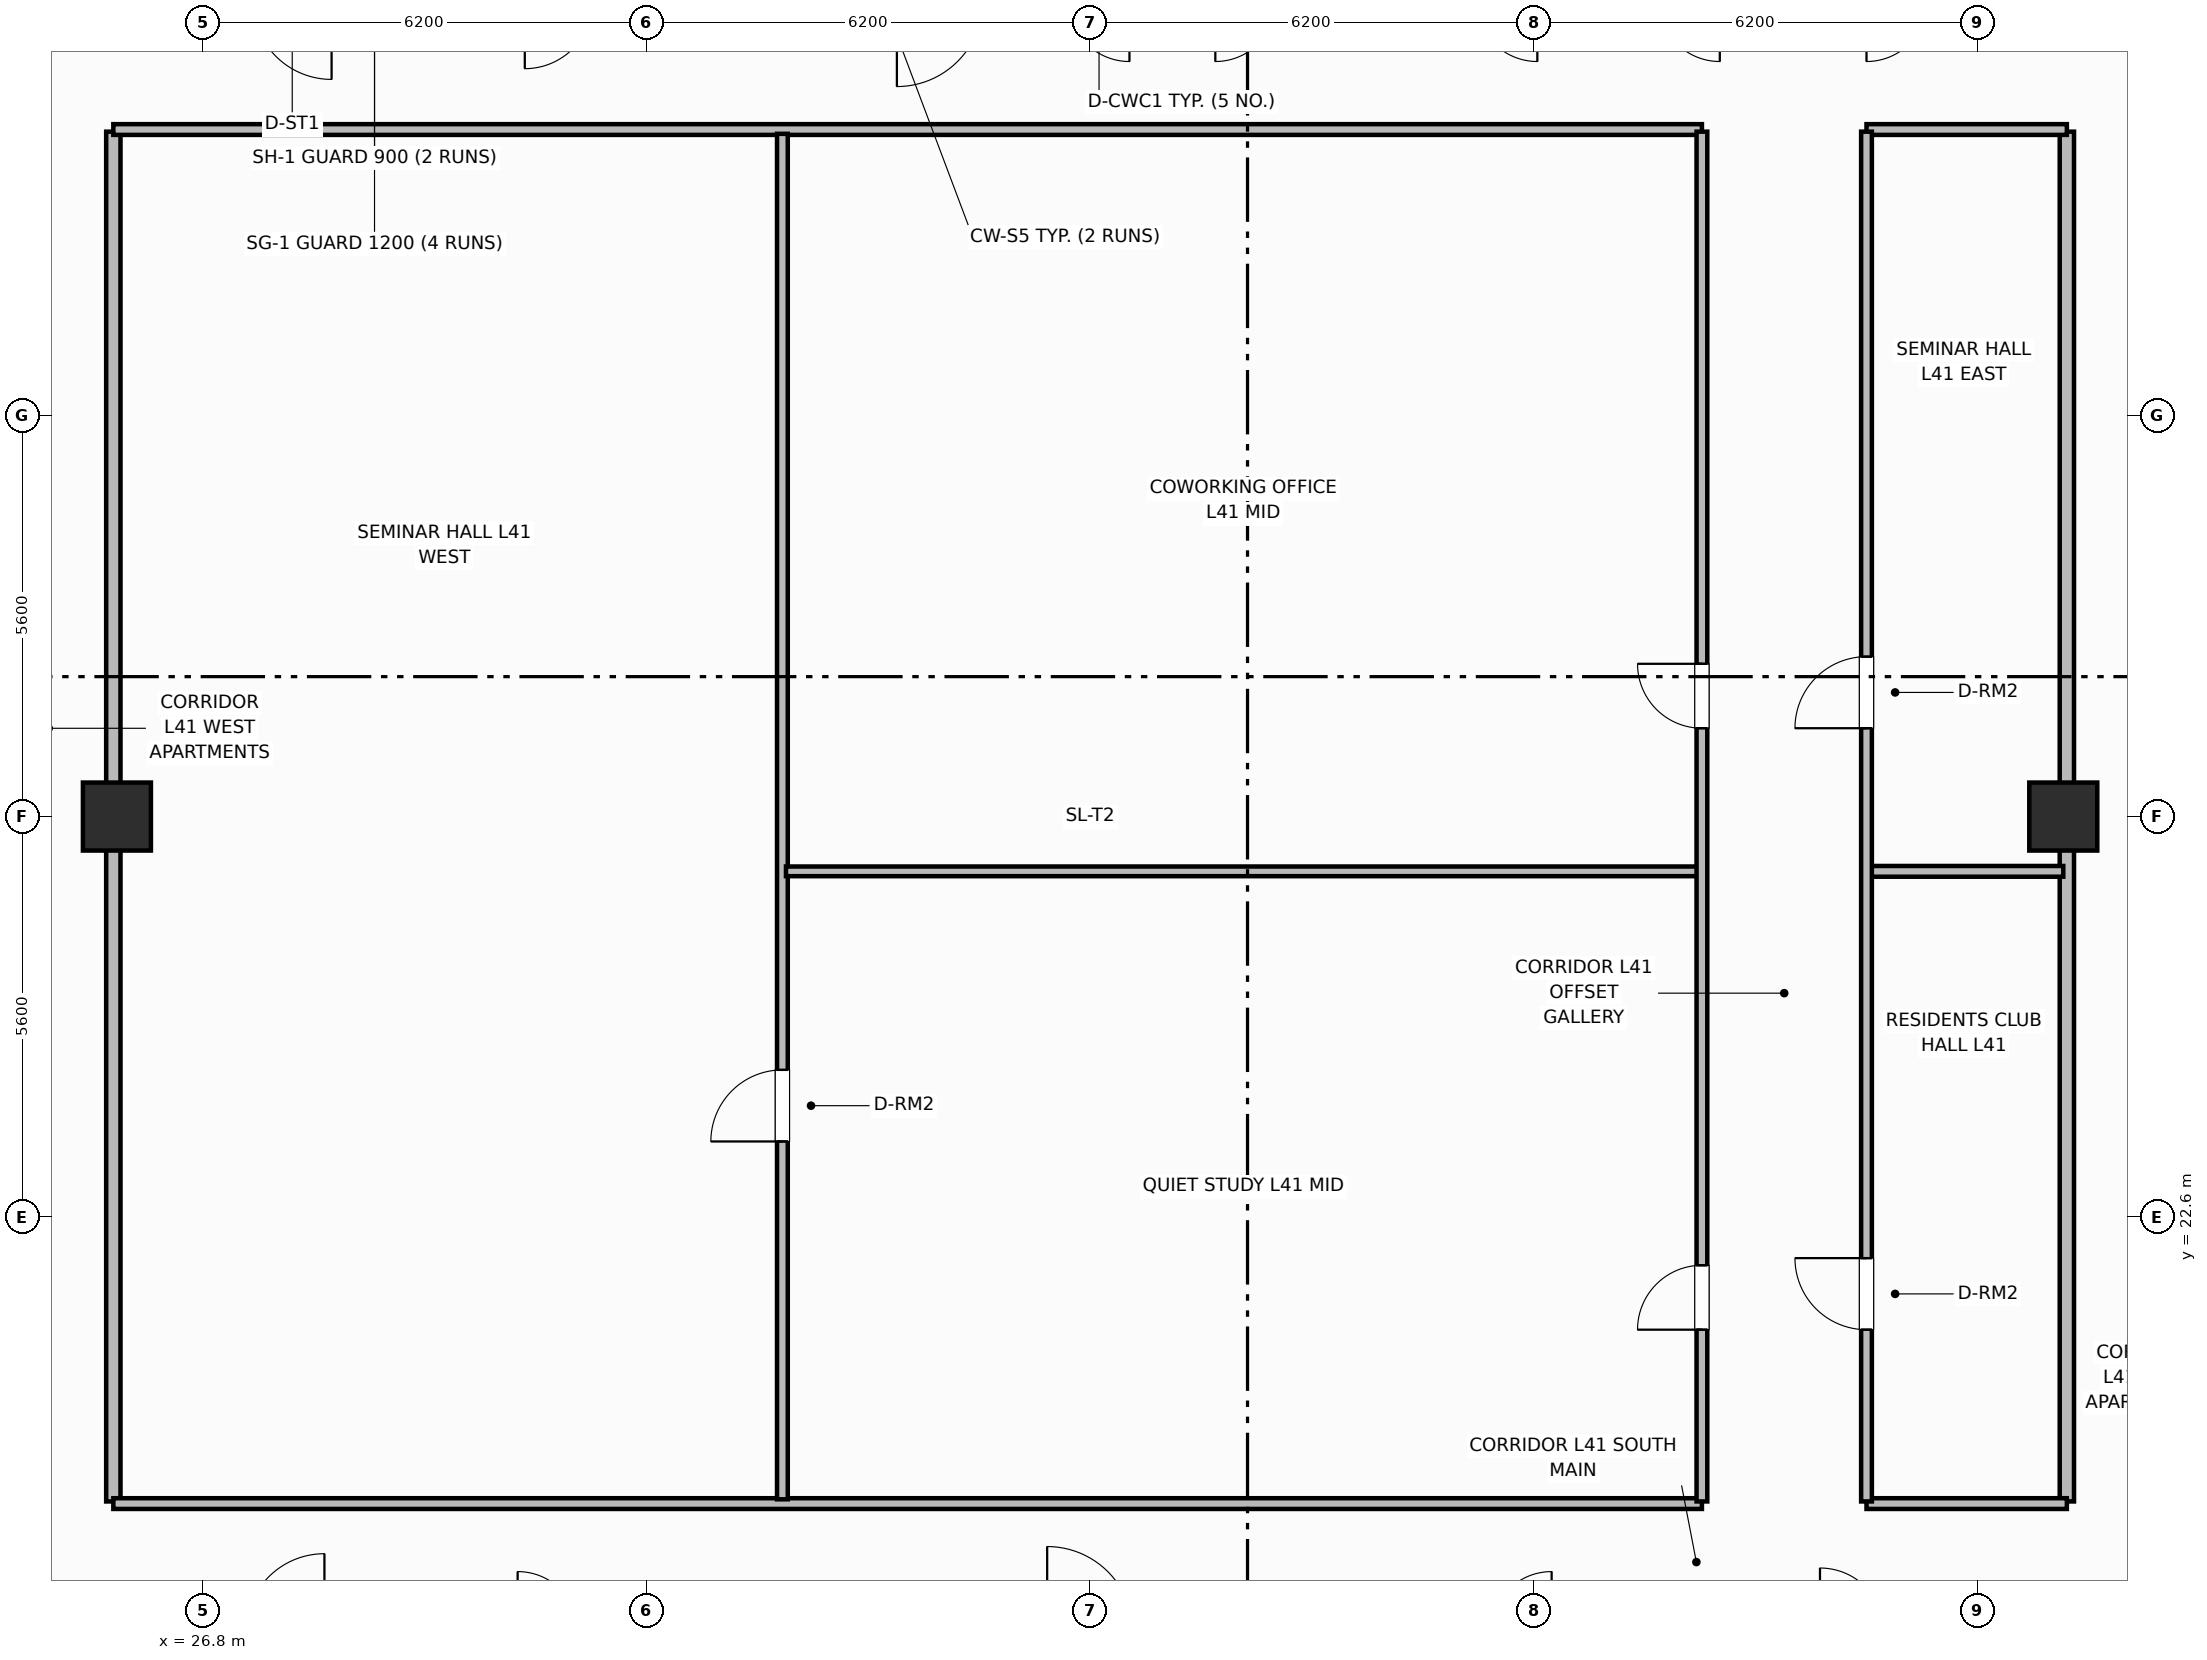
"""IFC4 building model, lengths in metres.
Left out: names, types, materials, properties, quantities, classifications, styles, units other than length and angle.
Written with IfcOpenShell. Run it as: python <this file> out.ifc"""

import sys

from ifc_helpers import new_model, si_unit, direction, frame, frame_2d, origin, origin_2d, place, context, subcontext, project, spatial, rectangle, extrude, element, fill, save


model = new_model("IFC4")
c1 = context("Model", 3, precision=1e-05, world=origin(), true_north=direction((0.0, 1.0)))
c2 = subcontext(c1, "Body", "Model", "MODEL_VIEW")
j1 = project(units=[si_unit("LENGTHUNIT", "METRE"), si_unit("PLANEANGLEUNIT", "RADIAN")], contexts=[c1])
p1 = place(None, origin())
s1 = spatial("IfcSite", under=j1, at=p1, CompositionType="ELEMENT")
p2 = place(p1, origin())
s2 = spatial("IfcBuilding", under=s1, at=p2, CompositionType="ELEMENT")
p3 = place(p2, frame((0.0, 0.0, 166.3)))
s3 = spatial("IfcBuildingStorey", under=s2, at=p3, CompositionType="ELEMENT", Elevation=166.3)
for number, where, z_axis, x_axis in (
    (1, (25.6, 28.2, 0.0), (0.0, 0.0, 1.0), (1.0, 0.0, 0.0)),
    (2, (52.8, 28.2, 0.0), (0.0, 0.0, 1.0), (1.0, 0.0, 0.0)),
):
    element("IfcColumn", number, at=place(p3, frame(where, z_axis=z_axis, x_axis=x_axis)), inside=s3, PredefinedType="COLUMN", context=c2, shape_type="SweptSolid", body=[
        extrude(rectangle(XDim=0.95, YDim=0.95, at=origin_2d()), origin(), (0.0, 0.0, 1.0), 3.7),
    ])
for number, where, z_axis, x_axis in (
    (3, (25.55, 18.63, 0.0), (0.0, 0.0, 1.0), (0.0, 1.0, 0.0)),
    (4, (52.85, 18.63, 0.0), (0.0, 0.0, 1.0), (0.0, 1.0, 0.0)),
):
    element("IfcWall", number, at=place(p3, frame(where, z_axis=z_axis, x_axis=x_axis)), inside=s3, PredefinedType="PARTITIONING", context=c2, shape_type="SweptSolid", body=[
        extrude(rectangle(XDim=19.14, YDim=0.2, at=frame_2d((9.57, 0.0))), origin(), (0.0, 0.0, 1.0), 2.55),
    ])
p4 = place(p3, frame((25.55, 18.6, 0.0), z_axis=(0.0, 0.0, 1.0), x_axis=(1.0, 0.0, 0.0)))
e5 = element("IfcWall", 5, at=p4, inside=s3, PredefinedType="PARTITIONING", context=c2, shape_type="SweptSolid", body=[
    extrude(rectangle(XDim=22.2, YDim=0.15, at=frame_2d((11.1, 0.0))), origin(), (0.0, 0.0, 1.0), 2.55),
])
p5 = place(p3, frame((50.05, 18.6, 0.0), z_axis=(0.0, 0.0, 1.0), x_axis=(1.0, 0.0, 0.0)))
e6 = element("IfcWall", 6, at=p5, inside=s3, PredefinedType="PARTITIONING", context=c2, shape_type="SweptSolid", body=[
    extrude(rectangle(XDim=2.8, YDim=0.15, at=frame_2d((1.4, 0.0))), origin(), (0.0, 0.0, 1.0), 2.55),
])
p6 = place(p3, frame((25.55, 37.8, 0.0), z_axis=(0.0, 0.0, 1.0), x_axis=(1.0, 0.0, 0.0)))
e7 = element("IfcWall", 7, at=p6, inside=s3, PredefinedType="PARTITIONING", context=c2, shape_type="SweptSolid", body=[
    extrude(rectangle(XDim=22.2, YDim=0.15, at=frame_2d((11.1, 0.0))), origin(), (0.0, 0.0, 1.0), 2.55),
])
p7 = place(p3, frame((50.05, 37.8, 0.0), z_axis=(0.0, 0.0, 1.0), x_axis=(1.0, 0.0, 0.0)))
e8 = element("IfcWall", 8, at=p7, inside=s3, PredefinedType="PARTITIONING", context=c2, shape_type="SweptSolid", body=[
    extrude(rectangle(XDim=2.8, YDim=0.15, at=frame_2d((1.4, 0.0))), origin(), (0.0, 0.0, 1.0), 2.55),
])
p8 = place(p3, frame((34.9, 18.66, 0.0), z_axis=(0.0, 0.0, 1.0), x_axis=(0.0, 1.0, 0.0)))
e9 = element("IfcWall", 9, at=p8, inside=s3, PredefinedType="PARTITIONING", context=c2, shape_type="SweptSolid", body=[
    extrude(rectangle(XDim=19.08, YDim=0.15, at=frame_2d((9.54, 0.0))), origin(), (0.0, 0.0, 1.0), 2.55),
])
p9 = place(p8, frame((5.0, 0.0, 0.0)))
e10 = element("IfcOpeningElement", 10, at=p9, cuts=e9, PredefinedType="OPENING", context=c2, shape_type="SweptSolid", body=[
    extrude(rectangle(XDim=1.0, YDim=2.15, at=frame_2d((0.5, 1.075))), frame((0.0, 0.085, 0.0), z_axis=(0.0, -1.0, 0.0), x_axis=(1.0, 0.0, 0.0)), (0.0, 0.0, 1.0), 0.17),
])
p10 = place(p3, frame((34.95, 27.434, 0.0), z_axis=(0.0, 0.0, 1.0), x_axis=(1.0, 0.0, 0.0)))
e11 = element("IfcWall", 11, at=p10, inside=s3, PredefinedType="PARTITIONING", context=c2, shape_type="SweptSolid", body=[
    extrude(rectangle(XDim=12.81, YDim=0.135, at=frame_2d((6.405, 0.0))), origin(), (0.0, 0.0, 1.0), 2.55),
])
p11 = place(p3, frame((50.08, 27.434, 0.0), z_axis=(0.0, 0.0, 1.0), x_axis=(1.0, 0.0, 0.0)))
e12 = element("IfcWall", 12, at=p11, inside=s3, PredefinedType="PARTITIONING", context=c2, shape_type="SweptSolid", body=[
    extrude(rectangle(XDim=2.72, YDim=0.15, at=frame_2d((1.36, 0.0))), origin(), (0.0, 0.0, 1.0), 2.55),
])
p12 = place(p3, frame((47.75, 18.63, 0.0), z_axis=(0.0, 0.0, 1.0), x_axis=(0.0, 1.0, 0.0)))
e13 = element("IfcWall", 13, at=p12, inside=s3, PredefinedType="PARTITIONING", context=c2, shape_type="SweptSolid", body=[
    extrude(rectangle(XDim=19.14, YDim=0.15, at=frame_2d((9.57, 0.0))), origin(), (0.0, 0.0, 1.0), 2.55),
])
p13 = place(p12, frame((2.4, 0.0, 0.0)))
e14 = element("IfcOpeningElement", 14, at=p13, cuts=e13, PredefinedType="OPENING", context=c2, shape_type="SweptSolid", body=[
    extrude(rectangle(XDim=0.9, YDim=2.1, at=frame_2d((0.45, 1.05))), frame((0.0, 0.085, 0.0), z_axis=(0.0, -1.0, 0.0), x_axis=(1.0, 0.0, 0.0)), (0.0, 0.0, 1.0), 0.17),
])
p14 = place(p12, frame((10.804, 0.0, 0.0)))
e15 = element("IfcOpeningElement", 15, at=p14, cuts=e13, PredefinedType="OPENING", context=c2, shape_type="SweptSolid", body=[
    extrude(rectangle(XDim=0.9, YDim=2.1, at=frame_2d((0.45, 1.05))), frame((0.0, 0.085, 0.0), z_axis=(0.0, -1.0, 0.0), x_axis=(1.0, 0.0, 0.0)), (0.0, 0.0, 1.0), 0.17),
])
p15 = place(p3, frame((50.05, 18.63, 0.0), z_axis=(0.0, 0.0, 1.0), x_axis=(0.0, 1.0, 0.0)))
e16 = element("IfcWall", 16, at=p15, inside=s3, PredefinedType="PARTITIONING", context=c2, shape_type="SweptSolid", body=[
    extrude(rectangle(XDim=19.14, YDim=0.15, at=frame_2d((9.57, 0.0))), origin(), (0.0, 0.0, 1.0), 2.55),
])
p16 = place(p15, frame((2.4, 0.0, 0.0)))
e17 = element("IfcOpeningElement", 17, at=p16, cuts=e16, PredefinedType="OPENING", context=c2, shape_type="SweptSolid", body=[
    extrude(rectangle(XDim=1.0, YDim=2.15, at=frame_2d((0.5, 1.075))), frame((0.0, 0.085, 0.0), z_axis=(0.0, -1.0, 0.0), x_axis=(1.0, 0.0, 0.0)), (0.0, 0.0, 1.0), 0.17),
])
p17 = place(p15, frame((10.804, 0.0, 0.0)))
e18 = element("IfcOpeningElement", 18, at=p17, cuts=e16, PredefinedType="OPENING", context=c2, shape_type="SweptSolid", body=[
    extrude(rectangle(XDim=1.0, YDim=2.15, at=frame_2d((0.5, 1.075))), frame((0.0, 0.085, 0.0), z_axis=(0.0, -1.0, 0.0), x_axis=(1.0, 0.0, 0.0)), (0.0, 0.0, 1.0), 0.17),
])
p18 = place(p9, origin())
e19 = element("IfcDoor", 19, at=p18, inside=s3, OperationType="SINGLE_SWING_LEFT", PredefinedType="DOOR", context=c2, shape_type="SweptSolid", body=[
    extrude(rectangle(XDim=1.0, YDim=2.15, at=frame_2d((0.5, 1.075))), frame((0.0, 0.025, 0.0), z_axis=(0.0, -1.0, 0.0), x_axis=(1.0, 0.0, 0.0)), (0.0, 0.0, 1.0), 0.05),
])
fill(e10, e19)
p19 = place(p13, origin())
e20 = element("IfcDoor", 20, at=p19, inside=s3, OperationType="SINGLE_SWING_LEFT", PredefinedType="DOOR", context=c2, shape_type="SweptSolid", body=[
    extrude(rectangle(XDim=0.9, YDim=2.1, at=frame_2d((0.45, 1.05))), frame((0.0, 0.025, 0.0), z_axis=(0.0, -1.0, 0.0), x_axis=(1.0, 0.0, 0.0)), (0.0, 0.0, 1.0), 0.05),
])
fill(e14, e20)
p20 = place(p14, origin())
e21 = element("IfcDoor", 21, at=p20, inside=s3, OperationType="SINGLE_SWING_RIGHT", PredefinedType="DOOR", context=c2, shape_type="SweptSolid", body=[
    extrude(rectangle(XDim=0.9, YDim=2.1, at=frame_2d((0.45, 1.05))), frame((0.0, 0.025, 0.0), z_axis=(0.0, -1.0, 0.0), x_axis=(1.0, 0.0, 0.0)), (0.0, 0.0, 1.0), 0.05),
])
fill(e15, e21)
p21 = place(p16, origin())
e22 = element("IfcDoor", 22, at=p21, inside=s3, OperationType="SINGLE_SWING_RIGHT", PredefinedType="DOOR", context=c2, shape_type="SweptSolid", body=[
    extrude(rectangle(XDim=1.0, YDim=2.15, at=frame_2d((0.5, 1.075))), frame((0.0, 0.025, 0.0), z_axis=(0.0, -1.0, 0.0), x_axis=(1.0, 0.0, 0.0)), (0.0, 0.0, 1.0), 0.05),
])
fill(e17, e22)
p22 = place(p17, origin())
e23 = element("IfcDoor", 23, at=p22, inside=s3, OperationType="SINGLE_SWING_LEFT", PredefinedType="DOOR", context=c2, shape_type="SweptSolid", body=[
    extrude(rectangle(XDim=1.0, YDim=2.15, at=frame_2d((0.5, 1.075))), frame((0.0, 0.025, 0.0), z_axis=(0.0, -1.0, 0.0), x_axis=(1.0, 0.0, 0.0)), (0.0, 0.0, 1.0), 0.05),
])
fill(e18, e23)
save(model, sys.argv[1])
